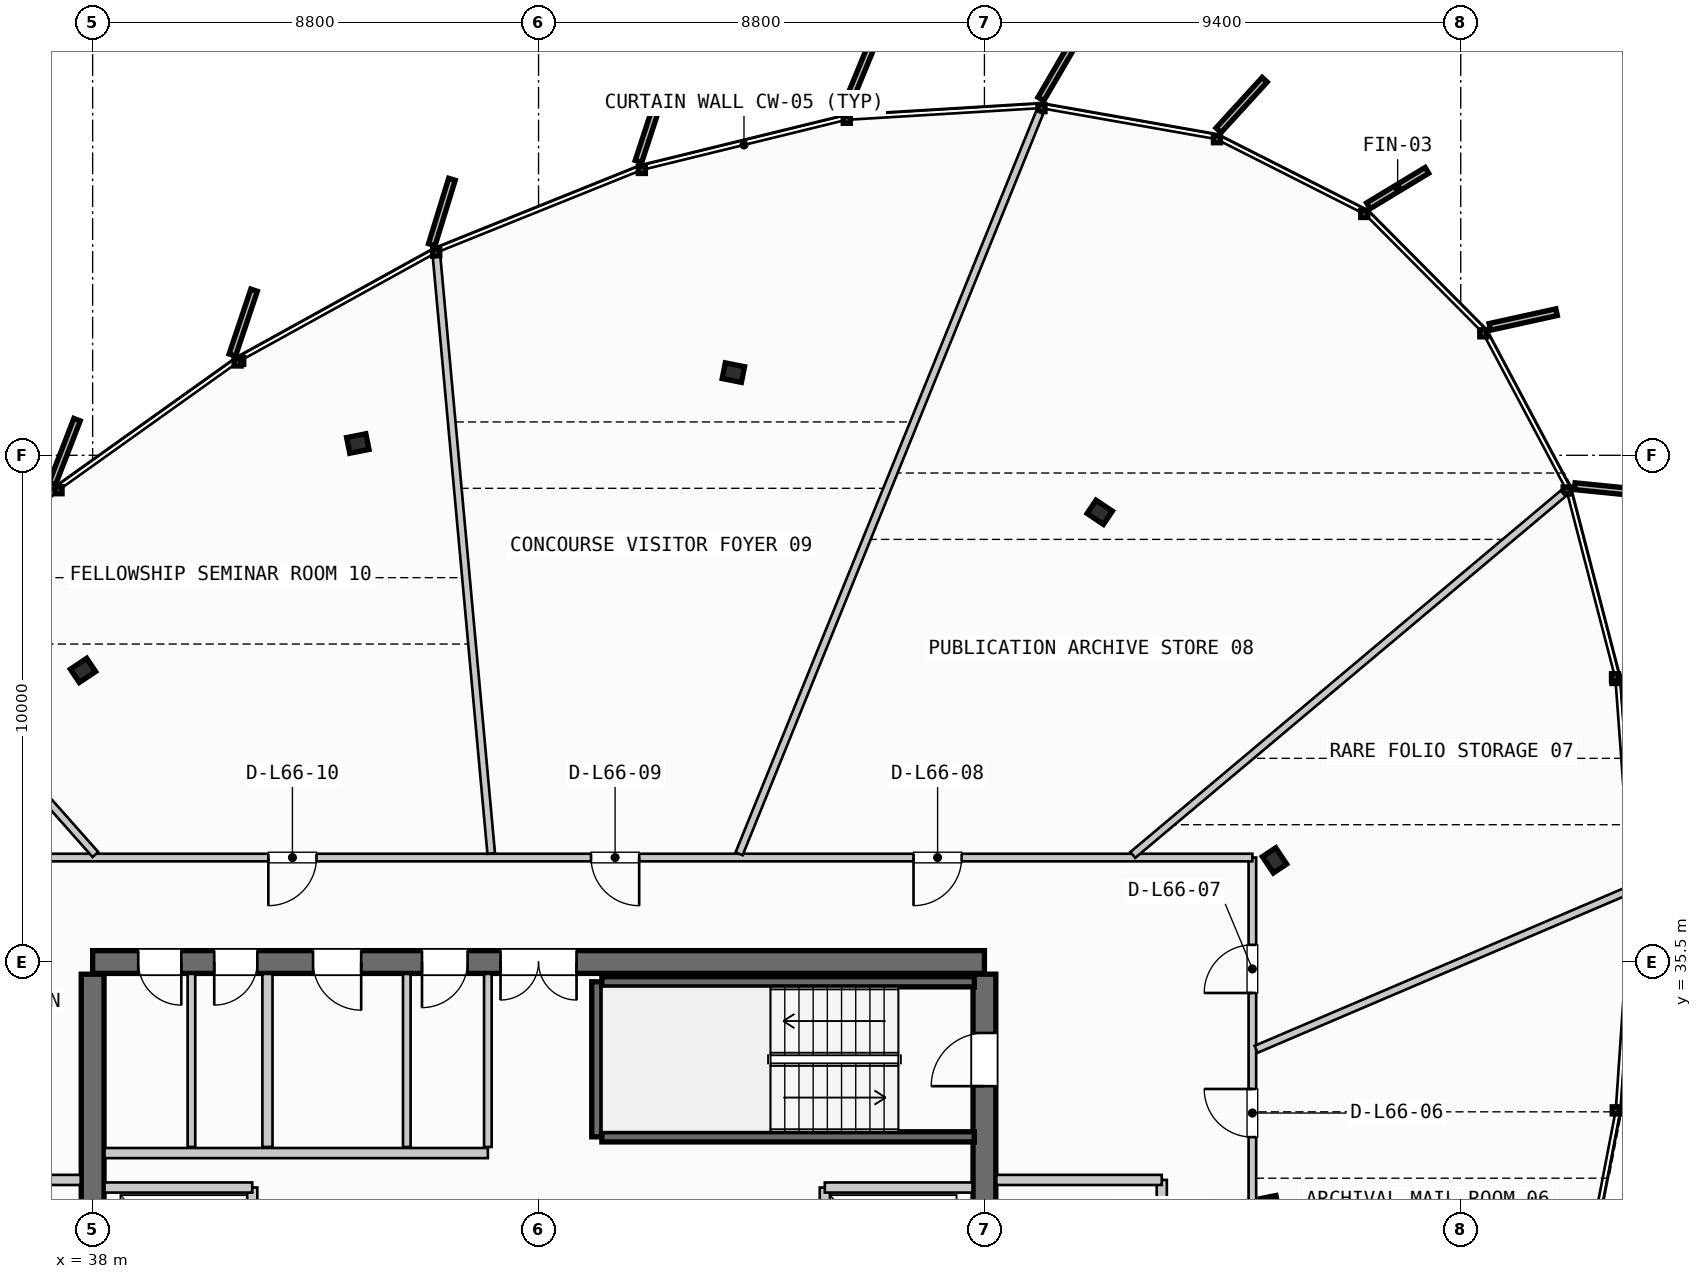
"""IFC4 building model, lengths in metres.
Left out: names, types, materials, properties, quantities, classifications, styles, units other than length and angle.
Written with IfcOpenShell. Run it as: python <this file> out.ifc"""

import sys

from ifc_helpers import new_model, si_unit, direction, frame, frame_2d, origin, origin_2d, place, context, subcontext, project, spatial, rectangle, i_section, extrude, source, transform, mapped, element, fill, save


model = new_model("IFC4")
c1 = context("Model", 3, precision=1e-05, world=origin(), true_north=direction((0.0, 1.0)))
c2 = subcontext(c1, "Body", "Model", "MODEL_VIEW")
j1 = project(units=[si_unit("LENGTHUNIT", "METRE"), si_unit("PLANEANGLEUNIT", "RADIAN")], contexts=[c1])
p1 = place(None, origin())
s1 = spatial("IfcSite", under=j1, at=p1, CompositionType="ELEMENT")
p2 = place(p1, origin())
s2 = spatial("IfcBuilding", under=s1, at=p2, CompositionType="ELEMENT")
p3 = place(p2, frame((0.0, 0.0, 252.55)))
s3 = spatial("IfcBuildingStorey", under=s2, at=p3, CompositionType="ELEMENT", Elevation=252.55)
p4 = place(p3, frame((55.6, 35.5, 0.0), z_axis=(0.0, 0.0, 1.0), x_axis=(-1.0, 0.0, 0.0)))
e1 = element("IfcWall", 1, at=p4, inside=s3, PredefinedType="SHEAR", context=c2, shape_type="SweptSolid", body=[
    extrude(rectangle(XDim=17.6, YDim=0.45, at=frame_2d((8.8, 0.0))), origin(), (0.0, 0.0, 1.0), 3.21),
])
p5 = place(p4, frame((8.05, 0.0, 0.0)))
e2 = element("IfcOpeningElement", 2, at=p5, cuts=e1, PredefinedType="OPENING", context=c2, shape_type="SweptSolid", body=[
    extrude(rectangle(XDim=1.5, YDim=2.2, at=frame_2d((0.75, 1.1))), frame((0.0, 0.235, 0.0), z_axis=(0.0, -1.0, 0.0), x_axis=(1.0, 0.0, 0.0)), (0.0, 0.0, 1.0), 0.47),
])
p6 = place(p4, frame((15.85, 0.0, 0.0)))
e3 = element("IfcOpeningElement", 3, at=p6, cuts=e1, PredefinedType="OPENING", context=c2, shape_type="SweptSolid", body=[
    extrude(rectangle(XDim=0.85, YDim=2.15, at=frame_2d((0.425, 1.075))), frame((0.0, 0.235, 0.0), z_axis=(0.0, -1.0, 0.0), x_axis=(1.0, 0.0, 0.0)), (0.0, 0.0, 1.0), 0.47),
])
p7 = place(p4, frame((14.35, 0.0, 0.0)))
e4 = element("IfcOpeningElement", 4, at=p7, cuts=e1, PredefinedType="OPENING", context=c2, shape_type="SweptSolid", body=[
    extrude(rectangle(XDim=0.85, YDim=2.15, at=frame_2d((0.425, 1.075))), frame((0.0, 0.235, 0.0), z_axis=(0.0, -1.0, 0.0), x_axis=(1.0, 0.0, 0.0)), (0.0, 0.0, 1.0), 0.47),
])
p8 = place(p4, frame((12.3, 0.0, 0.0)))
e5 = element("IfcOpeningElement", 5, at=p8, cuts=e1, PredefinedType="OPENING", context=c2, shape_type="SweptSolid", body=[
    extrude(rectangle(XDim=0.95, YDim=2.15, at=frame_2d((0.475, 1.075))), frame((0.0, 0.235, 0.0), z_axis=(0.0, -1.0, 0.0), x_axis=(1.0, 0.0, 0.0)), (0.0, 0.0, 1.0), 0.47),
])
p9 = place(p4, frame((10.2, 0.0, 0.0)))
e6 = element("IfcOpeningElement", 6, at=p9, cuts=e1, PredefinedType="OPENING", context=c2, shape_type="SweptSolid", body=[
    extrude(rectangle(XDim=0.9, YDim=2.15, at=frame_2d((0.45, 1.075))), frame((0.0, 0.235, 0.0), z_axis=(0.0, -1.0, 0.0), x_axis=(1.0, 0.0, 0.0)), (0.0, 0.0, 1.0), 0.47),
])
p10 = place(p3, frame((38.0, 35.26, 0.0), z_axis=(0.0, 0.0, 1.0), x_axis=(0.0, -1.0, 0.0)))
e7 = element("IfcWall", 7, at=p10, inside=s3, PredefinedType="SHEAR", context=c2, shape_type="SweptSolid", body=[
    extrude(rectangle(XDim=14.92, YDim=0.45, at=frame_2d((7.46, 0.0))), origin(), (0.0, 0.0, 1.0), 3.21),
])
p11 = place(p10, frame((5.21, 0.0, 0.0)))
e8 = element("IfcOpeningElement", 8, at=p11, cuts=e7, PredefinedType="OPENING", context=c2, shape_type="SweptSolid", body=[
    extrude(rectangle(XDim=1.1, YDim=2.2, at=frame_2d((0.55, 1.1))), frame((0.0, 0.235, 0.0), z_axis=(0.0, -1.0, 0.0), x_axis=(1.0, 0.0, 0.0)), (0.0, 0.0, 1.0), 0.47),
])
p12 = place(p3, frame((55.6, 20.34, 0.0), z_axis=(0.0, 0.0, 1.0), x_axis=(0.0, 1.0, 0.0)))
e9 = element("IfcWall", 9, at=p12, inside=s3, PredefinedType="SHEAR", context=c2, shape_type="SweptSolid", body=[
    extrude(rectangle(XDim=14.92, YDim=0.45, at=frame_2d((7.46, 0.0))), origin(), (0.0, 0.0, 1.0), 3.21),
])
p13 = place(p12, frame((12.71, 0.0, 0.0)))
e10 = element("IfcOpeningElement", 10, at=p13, cuts=e9, PredefinedType="OPENING", context=c2, shape_type="SweptSolid", body=[
    extrude(rectangle(XDim=1.05, YDim=2.15, at=frame_2d((0.525, 1.075))), frame((0.0, 0.235, 0.0), z_axis=(0.0, -1.0, 0.0), x_axis=(1.0, 0.0, 0.0)), (0.0, 0.0, 1.0), 0.47),
])
p14 = place(p12, frame((8.61, 0.0, 0.0)))
e11 = element("IfcOpeningElement", 11, at=p14, cuts=e9, PredefinedType="OPENING", context=c2, shape_type="SweptSolid", body=[
    extrude(rectangle(XDim=1.1, YDim=2.2, at=frame_2d((0.55, 1.1))), frame((0.0, 0.235, 0.0), z_axis=(0.0, -1.0, 0.0), x_axis=(1.0, 0.0, 0.0)), (0.0, 0.0, 1.0), 0.47),
])
m1 = source(origin(), c2, "Body", "SweptSolid", [
    extrude(i_section(OverallWidth=0.387, OverallDepth=0.316, WebThickness=0.019, FlangeThickness=0.028, FilletRadius=0.015, at=origin_2d()), origin(), (0.0, 0.0, 1.0), 3.21),
])
for number, where, z_axis, x_axis in (
    (12, (61.237, 30.672, 0.0), (0.0, 0.0, 1.0), (0.981, 0.195, 0.0)),
    (13, (61.326, 37.506, 0.0), (0.0, 0.0, 1.0), (0.831, 0.556, 0.0)),
    (14, (57.875, 44.375, 0.0), (0.0, 0.0, 1.0), (0.556, 0.831, 0.0)),
    (15, (50.645, 47.132, 0.0), (0.0, 0.0, 1.0), (0.195, 0.981, 0.0)),
    (16, (43.233, 45.732, 0.0), (0.0, 0.0, 1.0), (-0.195, 0.981, 0.0)),
    (17, (37.81, 41.255, 0.0), (0.0, 0.0, 1.0), (-0.556, 0.831, 0.0)),
):
    element("IfcColumn", number, at=place(p3, frame(where, z_axis=z_axis, x_axis=x_axis)), inside=s3, PredefinedType="COLUMN", context=c2, shape_type="MappedRepresentation", body=[
        mapped(m1, transform((0.0, 0.0, 0.0), scale=1.0)),
    ])
p15 = place(p3, frame((47.95, 32.05, 0.0), z_axis=(0.0, 0.0, 1.0), x_axis=(0.0, 1.0, 0.0)))
e18 = element("IfcWall", 18, at=p15, inside=s3, PredefinedType="SHEAR", context=c2, shape_type="SweptSolid", body=[
    extrude(rectangle(XDim=3.06, YDim=0.2, at=frame_2d((1.53, 0.0))), origin(), (0.0, 0.0, 1.0), 3.21),
])
for number, where, z_axis, x_axis in (
    (19, (48.05, 35.11, 0.0), (0.0, 0.0, 1.0), (1.0, 0.0, 0.0)),
    (20, (55.4, 32.05, 0.0), (0.0, 0.0, 1.0), (-1.0, 0.0, 0.0)),
):
    element("IfcWall", number, at=place(p3, frame(where, z_axis=z_axis, x_axis=x_axis)), inside=s3, PredefinedType="SHEAR", context=c2, shape_type="SweptSolid", body=[
        extrude(rectangle(XDim=7.35, YDim=0.2, at=frame_2d((3.675, 0.0))), origin(), (0.0, 0.0, 1.0), 3.21),
    ])
p16 = place(p3, frame((41.15, 27.95, 0.0), z_axis=(0.0, 0.0, 1.0), x_axis=(0.0, 1.0, 0.0)))
e21 = element("IfcWall", 21, at=p16, inside=s3, PredefinedType="PARTITIONING", context=c2, shape_type="SweptSolid", body=[
    extrude(rectangle(XDim=3.1, YDim=0.2, at=frame_2d((1.55, 0.0))), origin(), (0.0, 0.0, 1.0), 2.28),
])
p17 = place(p3, frame((38.235, 31.05, 0.0), z_axis=(0.0, 0.0, 1.0), x_axis=(1.0, 0.0, 0.0)))
e22 = element("IfcWall", 22, at=p17, inside=s3, PredefinedType="PARTITIONING", context=c2, shape_type="SweptSolid", body=[
    extrude(rectangle(XDim=2.915, YDim=0.2, at=frame_2d((1.458, 0.0))), origin(), (0.0, 0.0, 1.0), 2.28),
])
p18 = place(p3, frame((34.5, 31.2, 0.0), z_axis=(0.0, 0.0, 1.0), x_axis=(1.0, 0.0, 0.0)))
e23 = element("IfcWall", 23, at=p18, inside=s3, PredefinedType="PARTITIONING", context=c2, shape_type="SweptSolid", body=[
    extrude(rectangle(XDim=3.265, YDim=0.2, at=frame_2d((1.632, 0.0))), origin(), (0.0, 0.0, 1.0), 2.28),
])
p19 = place(p3, frame((52.45, 27.95, 0.0), z_axis=(0.0, 0.0, 1.0), x_axis=(0.0, 1.0, 0.0)))
e24 = element("IfcWall", 24, at=p19, inside=s3, PredefinedType="PARTITIONING", context=c2, shape_type="SweptSolid", body=[
    extrude(rectangle(XDim=3.1, YDim=0.2, at=frame_2d((1.55, 0.0))), origin(), (0.0, 0.0, 1.0), 2.28),
])
p20 = place(p3, frame((52.45, 31.05, 0.0), z_axis=(0.0, 0.0, 1.0), x_axis=(1.0, 0.0, 0.0)))
e25 = element("IfcWall", 25, at=p20, inside=s3, PredefinedType="PARTITIONING", context=c2, shape_type="SweptSolid", body=[
    extrude(rectangle(XDim=2.915, YDim=0.2, at=frame_2d((1.458, 0.0))), origin(), (0.0, 0.0, 1.0), 2.28),
])
p21 = place(p3, frame((59.1, 26.8, 0.0), z_axis=(0.0, 0.0, 1.0), x_axis=(0.0, 1.0, 0.0)))
e26 = element("IfcWall", 26, at=p21, inside=s3, PredefinedType="PARTITIONING", context=c2, shape_type="SweptSolid", body=[
    extrude(rectangle(XDim=4.4, YDim=0.2, at=frame_2d((2.2, 0.0))), origin(), (0.0, 0.0, 1.0), 2.28),
])
p22 = place(p21, frame((1.65, 0.0, 0.0)))
e27 = element("IfcOpeningElement", 27, at=p22, cuts=e26, PredefinedType="OPENING", context=c2, shape_type="SweptSolid", body=[
    extrude(rectangle(XDim=1.05, YDim=2.15, at=frame_2d((0.525, 1.075))), frame((0.0, 0.11, 0.0), z_axis=(0.0, -1.0, 0.0), x_axis=(1.0, 0.0, 0.0)), (0.0, 0.0, 1.0), 0.22),
])
p23 = place(p3, frame((55.835, 31.2, 0.0), z_axis=(0.0, 0.0, 1.0), x_axis=(1.0, 0.0, 0.0)))
e28 = element("IfcWall", 28, at=p23, inside=s3, PredefinedType="PARTITIONING", context=c2, shape_type="SweptSolid", body=[
    extrude(rectangle(XDim=3.265, YDim=0.2, at=frame_2d((1.633, 0.0))), origin(), (0.0, 0.0, 1.0), 2.28),
])
p24 = place(p3, frame((41.45, 31.85, 0.0), z_axis=(0.0, 0.0, 1.0), x_axis=(0.0, 1.0, 0.0)))
e29 = element("IfcWall", 29, at=p24, inside=s3, PredefinedType="PARTITIONING", context=c2, shape_type="SweptSolid", body=[
    extrude(rectangle(XDim=3.415, YDim=0.2, at=frame_2d((1.708, 0.0))), origin(), (0.0, 0.0, 1.0), 2.28),
])
p25 = place(p3, frame((38.235, 31.73, 0.0), z_axis=(0.0, 0.0, 1.0), x_axis=(1.0, 0.0, 0.0)))
e30 = element("IfcWall", 30, at=p25, inside=s3, PredefinedType="PARTITIONING", context=c2, shape_type="SweptSolid", body=[
    extrude(rectangle(XDim=7.565, YDim=0.2, at=frame_2d((3.782, 0.0))), origin(), (0.0, 0.0, 1.0), 2.28),
])
for number, where, z_axis, x_axis in (
    (31, (45.8, 31.85, 0.0), (0.0, 0.0, 1.0), (0.0, 1.0, 0.0)),
    (32, (39.95, 31.85, 0.0), (0.0, 0.0, 1.0), (0.0, 1.0, 0.0)),
):
    element("IfcWall", number, at=place(p3, frame(where, z_axis=z_axis, x_axis=x_axis)), inside=s3, PredefinedType="PARTITIONING", context=c2, shape_type="SweptSolid", body=[
        extrude(rectangle(XDim=3.415, YDim=0.15, at=frame_2d((1.708, 0.0))), origin(), (0.0, 0.0, 1.0), 2.28),
    ])
p26 = place(p3, frame((44.2, 31.85, 0.0), z_axis=(0.0, 0.0, 1.0), x_axis=(0.0, 1.0, 0.0)))
e33 = element("IfcWall", 33, at=p26, inside=s3, PredefinedType="PLUMBINGWALL", context=c2, shape_type="SweptSolid", body=[
    extrude(rectangle(XDim=3.415, YDim=0.15, at=frame_2d((1.708, 0.0))), origin(), (0.0, 0.0, 1.0), 2.28),
])
p27 = place(p3, frame((60.888, 18.269, 0.0), z_axis=(0.0, 0.0, 1.0), x_axis=(0.0, 1.0, 0.0)))
e34 = element("IfcWall", 34, at=p27, inside=s3, PredefinedType="PARTITIONING", context=c2, shape_type="SweptSolid", body=[
    extrude(rectangle(XDim=19.293, YDim=0.15, at=frame_2d((9.646, 0.0))), origin(), (0.0, 0.0, 1.0), 2.28),
])
p28 = place(p27, frame((4.488, 0.0, 0.0)))
e35 = element("IfcOpeningElement", 35, at=p28, cuts=e34, PredefinedType="OPENING", context=c2, shape_type="SweptSolid", body=[
    extrude(rectangle(XDim=0.95, YDim=2.15, at=frame_2d((0.475, 1.075))), frame((0.0, 0.085, 0.0), z_axis=(0.0, -1.0, 0.0), x_axis=(1.0, 0.0, 0.0)), (0.0, 0.0, 1.0), 0.17),
])
p29 = place(p27, frame((13.776, 0.0, 0.0)))
e36 = element("IfcOpeningElement", 36, at=p29, cuts=e34, PredefinedType="OPENING", context=c2, shape_type="SweptSolid", body=[
    extrude(rectangle(XDim=0.95, YDim=2.15, at=frame_2d((0.475, 1.075))), frame((0.0, 0.085, 0.0), z_axis=(0.0, -1.0, 0.0), x_axis=(1.0, 0.0, 0.0)), (0.0, 0.0, 1.0), 0.17),
])
p30 = place(p27, frame((16.62, 0.0, 0.0)))
e37 = element("IfcOpeningElement", 37, at=p30, cuts=e34, PredefinedType="OPENING", context=c2, shape_type="SweptSolid", body=[
    extrude(rectangle(XDim=0.95, YDim=2.15, at=frame_2d((0.475, 1.075))), frame((0.0, 0.085, 0.0), z_axis=(0.0, -1.0, 0.0), x_axis=(1.0, 0.0, 0.0)), (0.0, 0.0, 1.0), 0.17),
])
p31 = place(p3, frame((60.888, 37.562, 0.0), z_axis=(0.0, 0.0, 1.0), x_axis=(-1.0, 0.0, 0.0)))
e38 = element("IfcWall", 38, at=p31, inside=s3, PredefinedType="PARTITIONING", context=c2, shape_type="SweptSolid", body=[
    extrude(rectangle(XDim=28.038, YDim=0.15, at=frame_2d((14.019, 0.0))), origin(), (0.0, 0.0, 1.0), 2.28),
])
p32 = place(p31, frame((5.737, 0.0, 0.0)))
e39 = element("IfcOpeningElement", 39, at=p32, cuts=e38, PredefinedType="OPENING", context=c2, shape_type="SweptSolid", body=[
    extrude(rectangle(XDim=0.95, YDim=2.15, at=frame_2d((0.475, 1.075))), frame((0.0, 0.085, 0.0), z_axis=(0.0, -1.0, 0.0), x_axis=(1.0, 0.0, 0.0)), (0.0, 0.0, 1.0), 0.17),
])
p33 = place(p31, frame((12.102, 0.0, 0.0)))
e40 = element("IfcOpeningElement", 40, at=p33, cuts=e38, PredefinedType="OPENING", context=c2, shape_type="SweptSolid", body=[
    extrude(rectangle(XDim=0.95, YDim=2.15, at=frame_2d((0.475, 1.075))), frame((0.0, 0.085, 0.0), z_axis=(0.0, -1.0, 0.0), x_axis=(1.0, 0.0, 0.0)), (0.0, 0.0, 1.0), 0.17),
])
p34 = place(p31, frame((18.47, 0.0, 0.0)))
e41 = element("IfcOpeningElement", 41, at=p34, cuts=e38, PredefinedType="OPENING", context=c2, shape_type="SweptSolid", body=[
    extrude(rectangle(XDim=0.95, YDim=2.15, at=frame_2d((0.475, 1.075))), frame((0.0, 0.085, 0.0), z_axis=(0.0, -1.0, 0.0), x_axis=(1.0, 0.0, 0.0)), (0.0, 0.0, 1.0), 0.17),
])
p35 = place(p31, frame((24.644, 0.0, 0.0)))
e42 = element("IfcOpeningElement", 42, at=p35, cuts=e38, PredefinedType="OPENING", context=c2, shape_type="SweptSolid", body=[
    extrude(rectangle(XDim=0.95, YDim=2.15, at=frame_2d((0.475, 1.075))), frame((0.0, 0.085, 0.0), z_axis=(0.0, -1.0, 0.0), x_axis=(1.0, 0.0, 0.0)), (0.0, 0.0, 1.0), 0.17),
])
p36 = place(p3, frame((60.962, 33.778, 0.0), z_axis=(0.0, 0.0, 1.0), x_axis=(0.919763098903, 0.392474001554, 0.0)))
e43 = element("IfcWall", 43, at=p36, inside=s3, PredefinedType="PARTITIONING", context=c2, shape_type="SweptSolid", body=[
    extrude(rectangle(XDim=7.954, YDim=0.15, at=frame_2d((3.977, 0.0))), origin(), (0.0, 0.0, 1.0), 2.28),
])
p37 = place(p3, frame((58.528, 37.613, 0.0), z_axis=(0.0, 0.0, 1.0), x_axis=(0.765760359394, 0.643126015631, 0.0)))
e44 = element("IfcWall", 44, at=p37, inside=s3, PredefinedType="PARTITIONING", context=c2, shape_type="SweptSolid", body=[
    extrude(rectangle(XDim=11.093, YDim=0.15, at=frame_2d((5.546, 0.0))), origin(), (0.0, 0.0, 1.0), 2.28),
])
p38 = place(p3, frame((50.758, 37.636, 0.0), z_axis=(0.0, 0.0, 1.0), x_axis=(0.375803805358, 0.926699249961, 0.0)))
e45 = element("IfcWall", 45, at=p38, inside=s3, PredefinedType="PARTITIONING", context=c2, shape_type="SweptSolid", body=[
    extrude(rectangle(XDim=15.79, YDim=0.15, at=frame_2d((7.895, 0.0))), origin(), (0.0, 0.0, 1.0), 2.28),
])
p39 = place(p3, frame((45.866, 37.642, 0.0), z_axis=(0.0, 0.0, 1.0), x_axis=(-0.091193290442, 0.995833210823, 0.0)))
e46 = element("IfcWall", 46, at=p39, inside=s3, PredefinedType="PARTITIONING", context=c2, shape_type="SweptSolid", body=[
    extrude(rectangle(XDim=11.817, YDim=0.15, at=frame_2d((5.909, 0.0))), origin(), (0.0, 0.0, 1.0), 2.28),
])
p40 = place(p3, frame((38.054, 37.622, 0.0), z_axis=(0.0, 0.0, 1.0), x_axis=(-0.663185102797, 0.748455422472, 0.0)))
e47 = element("IfcWall", 47, at=p40, inside=s3, PredefinedType="PARTITIONING", context=c2, shape_type="SweptSolid", body=[
    extrude(rectangle(XDim=5.712, YDim=0.15, at=frame_2d((2.856, 0.0))), origin(), (0.0, 0.0, 1.0), 2.28),
])
m2 = source(origin(), c2, "Body", "SweptSolid", [
    extrude(rectangle(XDim=1.05, YDim=2.15, at=frame_2d((0.525, 1.075))), frame((0.0, 0.025, 0.0), z_axis=(0.0, -1.0, 0.0), x_axis=(1.0, 0.0, 0.0)), (0.0, 0.0, 1.0), 0.05),
])
p41 = place(p13, origin())
e48 = element("IfcDoor", 48, at=p41, inside=s3, OperationType="SINGLE_SWING_LEFT", PredefinedType="DOOR", context=c2, shape_type="MappedRepresentation", body=[
    mapped(m2, transform((0.0, 0.0, 0.0), scale=1.0)),
])
fill(e10, e48)
m3 = source(origin(), c2, "Body", "SweptSolid", [
    extrude(rectangle(XDim=1.5, YDim=2.2, at=frame_2d((0.75, 1.1))), frame((0.0, 0.025, 0.0), z_axis=(0.0, -1.0, 0.0), x_axis=(1.0, 0.0, 0.0)), (0.0, 0.0, 1.0), 0.05),
])
p42 = place(p5, origin())
e49 = element("IfcDoor", 49, at=p42, inside=s3, OperationType="DOUBLE_DOOR_SINGLE_SWING", PredefinedType="DOOR", context=c2, shape_type="MappedRepresentation", body=[
    mapped(m3, transform((0.0, 0.0, 0.0), scale=1.0)),
])
fill(e2, e49)
m4 = source(origin(), c2, "Body", "SweptSolid", [
    extrude(rectangle(XDim=0.85, YDim=2.15, at=frame_2d((0.425, 1.075))), frame((0.0, 0.025, 0.0), z_axis=(0.0, -1.0, 0.0), x_axis=(1.0, 0.0, 0.0)), (0.0, 0.0, 1.0), 0.05),
])
p43 = place(p6, origin())
e50 = element("IfcDoor", 50, at=p43, inside=s3, OperationType="SINGLE_SWING_LEFT", PredefinedType="DOOR", context=c2, shape_type="MappedRepresentation", body=[
    mapped(m4, transform((0.0, 0.0, 0.0), scale=1.0)),
])
fill(e3, e50)
p44 = place(p7, origin())
e51 = element("IfcDoor", 51, at=p44, inside=s3, OperationType="SINGLE_SWING_RIGHT", PredefinedType="DOOR", context=c2, shape_type="MappedRepresentation", body=[
    mapped(m4, transform((0.0, 0.0, 0.0), scale=1.0)),
])
fill(e4, e51)
m5 = source(origin(), c2, "Body", "SweptSolid", [
    extrude(rectangle(XDim=0.95, YDim=2.15, at=frame_2d((0.475, 1.075))), frame((0.0, 0.025, 0.0), z_axis=(0.0, -1.0, 0.0), x_axis=(1.0, 0.0, 0.0)), (0.0, 0.0, 1.0), 0.05),
])
p45 = place(p8, origin())
e52 = element("IfcDoor", 52, at=p45, inside=s3, OperationType="SINGLE_SWING_LEFT", PredefinedType="DOOR", context=c2, shape_type="MappedRepresentation", body=[
    mapped(m5, transform((0.0, 0.0, 0.0), scale=1.0)),
])
fill(e5, e52)
m6 = source(origin(), c2, "Body", "SweptSolid", [
    extrude(rectangle(XDim=0.9, YDim=2.15, at=frame_2d((0.45, 1.075))), frame((0.0, 0.025, 0.0), z_axis=(0.0, -1.0, 0.0), x_axis=(1.0, 0.0, 0.0)), (0.0, 0.0, 1.0), 0.05),
])
p46 = place(p9, origin())
e53 = element("IfcDoor", 53, at=p46, inside=s3, OperationType="SINGLE_SWING_RIGHT", PredefinedType="DOOR", context=c2, shape_type="MappedRepresentation", body=[
    mapped(m6, transform((0.0, 0.0, 0.0), scale=1.0)),
])
fill(e6, e53)
p47 = place(p29, origin())
e54 = element("IfcDoor", 54, at=p47, inside=s3, OperationType="SINGLE_SWING_RIGHT", PredefinedType="DOOR", context=c2, shape_type="MappedRepresentation", body=[
    mapped(m5, transform((0.0, 0.0, 0.0), scale=1.0)),
])
fill(e36, e54)
p48 = place(p30, origin())
e55 = element("IfcDoor", 55, at=p48, inside=s3, OperationType="SINGLE_SWING_LEFT", PredefinedType="DOOR", context=c2, shape_type="MappedRepresentation", body=[
    mapped(m5, transform((0.0, 0.0, 0.0), scale=1.0)),
])
fill(e37, e55)
p49 = place(p32, origin())
e56 = element("IfcDoor", 56, at=p49, inside=s3, OperationType="SINGLE_SWING_RIGHT", PredefinedType="DOOR", context=c2, shape_type="MappedRepresentation", body=[
    mapped(m5, transform((0.0, 0.0, 0.0), scale=1.0)),
])
fill(e39, e56)
p50 = place(p33, origin())
e57 = element("IfcDoor", 57, at=p50, inside=s3, OperationType="SINGLE_SWING_LEFT", PredefinedType="DOOR", context=c2, shape_type="MappedRepresentation", body=[
    mapped(m5, transform((0.0, 0.0, 0.0), scale=1.0)),
])
fill(e40, e57)
p51 = place(p34, origin())
e58 = element("IfcDoor", 58, at=p51, inside=s3, OperationType="SINGLE_SWING_RIGHT", PredefinedType="DOOR", context=c2, shape_type="MappedRepresentation", body=[
    mapped(m5, transform((0.0, 0.0, 0.0), scale=1.0)),
])
fill(e41, e58)
save(model, sys.argv[1])
